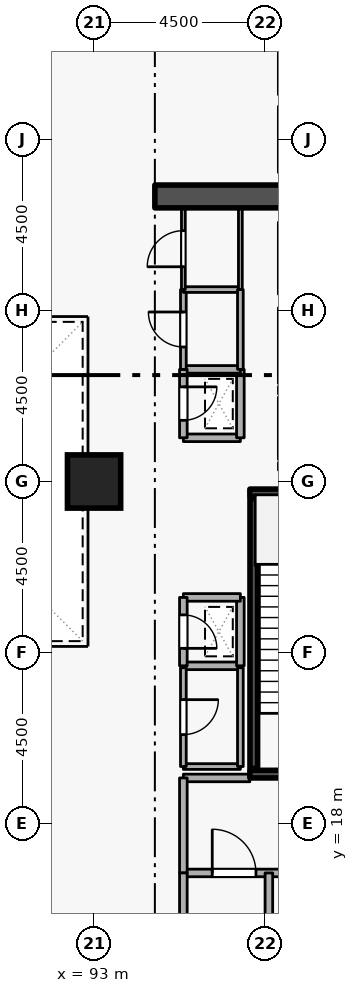
"""IFC4 building model, lengths in metres.
Left out: names, types, materials, properties, quantities, classifications, styles, units other than length and angle.
Written with IfcOpenShell. Run it as: python <this file> out.ifc"""

import sys

from ifc_helpers import new_model, si_unit, direction, frame, frame_2d, origin, origin_2d, place, context, subcontext, project, spatial, rectangle, extrude, element, fill, save


model = new_model("IFC4")
c1 = context("Model", 3, precision=1e-05, world=origin(), true_north=direction((0.0, 1.0)))
c2 = subcontext(c1, "Body", "Model", "MODEL_VIEW")
j1 = project(units=[si_unit("LENGTHUNIT", "METRE"), si_unit("PLANEANGLEUNIT", "RADIAN")], contexts=[c1])
p1 = place(None, origin())
s1 = spatial("IfcSite", under=j1, at=p1, CompositionType="ELEMENT")
p2 = place(p1, origin())
s2 = spatial("IfcBuilding", under=s1, at=p2, CompositionType="ELEMENT")
p3 = place(p2, origin())
s3 = spatial("IfcBuildingStorey", under=s2, at=p3, CompositionType="ELEMENT", Elevation=0.0)
p4 = place(p3, frame((94.6, 34.5, 0.0), z_axis=(0.0, 0.0, 1.0), x_axis=(1.0, 0.0, 0.0)))
e1 = element("IfcWall", 1, at=p4, inside=s3, PredefinedType="SHEAR", context=c2, shape_type="SweptSolid", body=[
    extrude(rectangle(XDim=5.7, YDim=0.6, at=frame_2d((2.85, 0.0))), origin(), (0.0, 0.0, 1.0), 4.8),
])
p5 = place(p3, frame((93.0, 27.0, 0.0), z_axis=(0.0, 0.0, 1.0), x_axis=(1.0, 0.0, 0.0)))
e2 = element("IfcColumn", 2, at=p5, inside=s3, PredefinedType="COLUMN", context=c2, shape_type="SweptSolid", body=[
    extrude(rectangle(XDim=1.4, YDim=1.4, at=origin_2d()), origin(), (0.0, 0.0, 1.0), 4.8),
])
p6 = place(p3, frame((97.95, 29.22, 0.0), z_axis=(0.0, 0.0, 1.0), x_axis=(0.0, -1.0, 0.0)))
e3 = element("IfcWall", 3, at=p6, inside=s3, PredefinedType="STANDARD", context=c2, shape_type="SweptSolid", body=[
    extrude(rectangle(XDim=1.64, YDim=0.2, at=frame_2d((0.82, 0.0))), origin(), (0.0, 0.0, 1.0), 4.46),
])
p7 = place(p6, frame((0.31, 0.0, 0.0)))
e4 = element("IfcOpeningElement", 4, at=p7, cuts=e3, PredefinedType="OPENING", context=c2, shape_type="SweptSolid", body=[
    extrude(rectangle(XDim=1.02, YDim=2.06, at=frame_2d((0.51, 1.03))), frame((0.0, 0.11, 0.0), z_axis=(0.0, -1.0, 0.0), x_axis=(1.0, 0.0, 0.0)), (0.0, 0.0, 1.0), 0.22),
])
p8 = place(p3, frame((97.95, 31.57, 0.0), z_axis=(0.0, 0.0, 1.0), x_axis=(0.0, -1.0, 0.0)))
e5 = element("IfcWall", 5, at=p8, inside=s3, PredefinedType="STANDARD", context=c2, shape_type="SweptSolid", body=[
    extrude(rectangle(XDim=1.99, YDim=0.2, at=frame_2d((0.995, 0.0))), origin(), (0.0, 0.0, 1.0), 4.46),
])
p9 = place(p8, frame((0.485, 0.0, 0.0)))
e6 = element("IfcOpeningElement", 6, at=p9, cuts=e5, PredefinedType="OPENING", context=c2, shape_type="SweptSolid", body=[
    extrude(rectangle(XDim=1.02, YDim=2.06, at=frame_2d((0.51, 1.03))), frame((0.0, 0.11, 0.0), z_axis=(0.0, -1.0, 0.0), x_axis=(1.0, 0.0, 0.0)), (0.0, 0.0, 1.0), 0.22),
])
p10 = place(p3, frame((97.95, 33.82, 0.0), z_axis=(0.0, 0.0, 1.0), x_axis=(0.0, -1.0, 0.0)))
e7 = element("IfcWall", 7, at=p10, inside=s3, PredefinedType="STANDARD", context=c2, shape_type="SweptSolid", body=[
    extrude(rectangle(XDim=1.89, YDim=0.2, at=frame_2d((0.945, 0.0))), origin(), (0.0, 0.0, 1.0), 4.46),
])
p11 = place(p10, frame((0.435, 0.0, 0.0)))
e8 = element("IfcOpeningElement", 8, at=p11, cuts=e7, PredefinedType="OPENING", context=c2, shape_type="SweptSolid", body=[
    extrude(rectangle(XDim=1.02, YDim=2.06, at=frame_2d((0.51, 1.03))), frame((0.0, 0.11, 0.0), z_axis=(0.0, -1.0, 0.0), x_axis=(1.0, 0.0, 0.0)), (0.0, 0.0, 1.0), 0.22),
])
p12 = place(p3, frame((97.95, 36.87, 0.0), z_axis=(0.0, 0.0, 1.0), x_axis=(0.0, -1.0, 0.0)))
e9 = element("IfcWall", 9, at=p12, inside=s3, PredefinedType="STANDARD", context=c2, shape_type="SweptSolid", body=[
    extrude(rectangle(XDim=1.74, YDim=0.2, at=frame_2d((0.87, 0.0))), origin(), (0.0, 0.0, 1.0), 4.46),
])
p13 = place(p12, frame((0.36, 0.0, 0.0)))
e10 = element("IfcOpeningElement", 10, at=p13, cuts=e9, PredefinedType="OPENING", context=c2, shape_type="SweptSolid", body=[
    extrude(rectangle(XDim=1.02, YDim=2.06, at=frame_2d((0.51, 1.03))), frame((0.0, 0.11, 0.0), z_axis=(0.0, -1.0, 0.0), x_axis=(1.0, 0.0, 0.0)), (0.0, 0.0, 1.0), 0.22),
])
p14 = place(p3, frame((97.95, 38.97, 0.0), z_axis=(0.0, 0.0, 1.0), x_axis=(0.0, -1.0, 0.0)))
e11 = element("IfcWall", 11, at=p14, inside=s3, PredefinedType="STANDARD", context=c2, shape_type="SweptSolid", body=[
    extrude(rectangle(XDim=1.79, YDim=0.2, at=frame_2d((0.895, 0.0))), origin(), (0.0, 0.0, 1.0), 4.46),
])
p15 = place(p14, frame((0.385, 0.0, 0.0)))
e12 = element("IfcOpeningElement", 12, at=p15, cuts=e11, PredefinedType="OPENING", context=c2, shape_type="SweptSolid", body=[
    extrude(rectangle(XDim=1.02, YDim=2.06, at=frame_2d((0.51, 1.03))), frame((0.0, 0.11, 0.0), z_axis=(0.0, -1.0, 0.0), x_axis=(1.0, 0.0, 0.0)), (0.0, 0.0, 1.0), 0.22),
])
p16 = place(p3, frame((100.45, 19.3, 0.0), z_axis=(0.0, 0.0, 1.0), x_axis=(-1.0, 0.0, 0.0)))
e13 = element("IfcWall", 13, at=p16, inside=s3, PredefinedType="SHEAR", context=c2, shape_type="SweptSolid", body=[
    extrude(rectangle(XDim=3.35, YDim=0.2, at=frame_2d((1.675, 0.0))), origin(), (0.0, 0.0, 1.0), 4.8),
])
p17 = place(p16, frame((1.125, 0.0, 0.0)))
e14 = element("IfcOpeningElement", 14, at=p17, cuts=e13, PredefinedType="OPENING", context=c2, shape_type="SweptSolid", body=[
    extrude(rectangle(XDim=1.1, YDim=2.1, at=frame_2d((0.55, 1.05))), frame((0.0, 0.11, 0.0), z_axis=(0.0, -1.0, 0.0), x_axis=(1.0, 0.0, 0.0)), (0.0, 0.0, 1.0), 0.22),
])
p18 = place(p3, frame((97.1, 26.7, 0.0), z_axis=(0.0, 0.0, 1.0), x_axis=(1.0, 0.0, 0.0)))
e15 = element("IfcWall", 15, at=p18, inside=s3, PredefinedType="SHEAR", context=c2, shape_type="SweptSolid", body=[
    extrude(rectangle(XDim=3.35, YDim=0.2, at=frame_2d((1.675, 0.0))), origin(), (0.0, 0.0, 1.0), 4.8),
])
p19 = place(p3, frame((97.203, 26.55, 0.0), z_axis=(0.0, 0.0, 1.0), x_axis=(0.0, -1.0, 0.0)))
e16 = element("IfcWall", 16, at=p19, inside=s3, PredefinedType="SHEAR", context=c2, shape_type="SweptSolid", body=[
    extrude(rectangle(XDim=7.1, YDim=0.2, at=frame_2d((3.55, 0.0))), origin(), (0.0, 0.0, 1.0), 4.8),
])
p20 = place(p3, frame((95.35, 16.7, 0.0), z_axis=(0.0, 0.0, 1.0), x_axis=(1.0, 0.0, 0.0)))
e17 = element("IfcWall", 17, at=p20, inside=s3, PredefinedType="STANDARD", context=c2, shape_type="SweptSolid", body=[
    extrude(rectangle(XDim=5.15, YDim=0.2, at=frame_2d((2.575, 0.0))), origin(), (0.0, 0.0, 1.0), 4.46),
])
p21 = place(p20, frame((2.917, 0.0, 0.0)))
e18 = element("IfcOpeningElement", 18, at=p21, cuts=e17, PredefinedType="OPENING", context=c2, shape_type="SweptSolid", body=[
    extrude(rectangle(XDim=1.15, YDim=2.1, at=frame_2d((0.575, 1.05))), frame((0.0, 0.11, 0.0), z_axis=(0.0, -1.0, 0.0), x_axis=(1.0, 0.0, 0.0)), (0.0, 0.0, 1.0), 0.22),
])
p22 = place(p20, frame((0.76, 0.0, 0.0)))
e19 = element("IfcOpeningElement", 19, at=p22, cuts=e17, PredefinedType="OPENING", context=c2, shape_type="SweptSolid", body=[
    extrude(rectangle(XDim=1.15, YDim=2.1, at=frame_2d((0.575, 1.05))), frame((0.0, 0.11, 0.0), z_axis=(0.0, -1.0, 0.0), x_axis=(1.0, 0.0, 0.0)), (0.0, 0.0, 1.0), 0.22),
])
p23 = place(p3, frame((97.1, 19.2, 0.0), z_axis=(0.0, 0.0, 1.0), x_axis=(-1.0, 0.0, 0.0)))
e20 = element("IfcWall", 20, at=p23, inside=s3, PredefinedType="STANDARD", context=c2, shape_type="SweptSolid", body=[
    extrude(rectangle(XDim=1.75, YDim=0.2, at=frame_2d((0.875, 0.0))), origin(), (0.0, 0.0, 1.0), 3.665),
])
p24 = place(p3, frame((95.35, 19.2, 0.0), z_axis=(0.0, 0.0, 1.0), x_axis=(0.0, -1.0, 0.0)))
e21 = element("IfcWall", 21, at=p24, inside=s3, PredefinedType="STANDARD", context=c2, shape_type="SweptSolid", body=[
    extrude(rectangle(XDim=2.5, YDim=0.2, at=frame_2d((1.25, 0.0))), origin(), (0.0, 0.0, 1.0), 4.46),
])
p25 = place(p3, frame((95.35, 28.15, 0.0), z_axis=(0.0, 0.0, 1.0), x_axis=(1.0, 0.0, 0.0)))
e22 = element("IfcWall", 22, at=p25, inside=s3, PredefinedType="STANDARD", context=c2, shape_type="SweptSolid", body=[
    extrude(rectangle(XDim=1.5, YDim=0.2, at=frame_2d((0.75, 0.0))), origin(), (0.0, 0.0, 1.0), 4.46),
])
p26 = place(p3, frame((96.85, 28.15, 0.0), z_axis=(0.0, 0.0, 1.0), x_axis=(0.0, 1.0, 0.0)))
e23 = element("IfcWall", 23, at=p26, inside=s3, PredefinedType="STANDARD", context=c2, shape_type="SweptSolid", body=[
    extrude(rectangle(XDim=1.8, YDim=0.2, at=frame_2d((0.9, 0.0))), origin(), (0.0, 0.0, 1.0), 4.46),
])
p27 = place(p3, frame((96.85, 29.95, 0.0), z_axis=(0.0, 0.0, 1.0), x_axis=(-1.0, 0.0, 0.0)))
e24 = element("IfcWall", 24, at=p27, inside=s3, PredefinedType="STANDARD", context=c2, shape_type="SweptSolid", body=[
    extrude(rectangle(XDim=1.5, YDim=0.2, at=frame_2d((0.75, 0.0))), origin(), (0.0, 0.0, 1.0), 4.46),
])
p28 = place(p3, frame((95.35, 29.95, 0.0), z_axis=(0.0, 0.0, 1.0), x_axis=(0.0, -1.0, 0.0)))
e25 = element("IfcWall", 25, at=p28, inside=s3, PredefinedType="STANDARD", context=c2, shape_type="SweptSolid", body=[
    extrude(rectangle(XDim=1.8, YDim=0.2, at=frame_2d((0.9, 0.0))), origin(), (0.0, 0.0, 1.0), 4.46),
])
p29 = place(p28, frame((0.46, 0.0, 0.0)))
e26 = element("IfcOpeningElement", 26, at=p29, cuts=e25, PredefinedType="OPENING", context=c2, shape_type="SweptSolid", body=[
    extrude(rectangle(XDim=0.88, YDim=2.04, at=frame_2d((0.44, 1.02))), frame((0.0, 0.11, 0.0), z_axis=(0.0, -1.0, 0.0), x_axis=(1.0, 0.0, 0.0)), (0.0, 0.0, 1.0), 0.22),
])
p30 = place(p3, frame((95.35, 22.15, 0.0), z_axis=(0.0, 0.0, 1.0), x_axis=(1.0, 0.0, 0.0)))
e27 = element("IfcWall", 27, at=p30, inside=s3, PredefinedType="STANDARD", context=c2, shape_type="SweptSolid", body=[
    extrude(rectangle(XDim=1.5, YDim=0.2, at=frame_2d((0.75, 0.0))), origin(), (0.0, 0.0, 1.0), 4.46),
])
p31 = place(p3, frame((96.85, 22.15, 0.0), z_axis=(0.0, 0.0, 1.0), x_axis=(0.0, 1.0, 0.0)))
e28 = element("IfcWall", 28, at=p31, inside=s3, PredefinedType="STANDARD", context=c2, shape_type="SweptSolid", body=[
    extrude(rectangle(XDim=1.8, YDim=0.2, at=frame_2d((0.9, 0.0))), origin(), (0.0, 0.0, 1.0), 4.46),
])
p32 = place(p3, frame((96.85, 23.95, 0.0), z_axis=(0.0, 0.0, 1.0), x_axis=(-1.0, 0.0, 0.0)))
e29 = element("IfcWall", 29, at=p32, inside=s3, PredefinedType="STANDARD", context=c2, shape_type="SweptSolid", body=[
    extrude(rectangle(XDim=1.5, YDim=0.2, at=frame_2d((0.75, 0.0))), origin(), (0.0, 0.0, 1.0), 4.46),
])
p33 = place(p3, frame((95.35, 23.95, 0.0), z_axis=(0.0, 0.0, 1.0), x_axis=(0.0, -1.0, 0.0)))
e30 = element("IfcWall", 30, at=p33, inside=s3, PredefinedType="STANDARD", context=c2, shape_type="SweptSolid", body=[
    extrude(rectangle(XDim=1.8, YDim=0.2, at=frame_2d((0.9, 0.0))), origin(), (0.0, 0.0, 1.0), 4.46),
])
p34 = place(p33, frame((0.46, 0.0, 0.0)))
e31 = element("IfcOpeningElement", 31, at=p34, cuts=e30, PredefinedType="OPENING", context=c2, shape_type="SweptSolid", body=[
    extrude(rectangle(XDim=0.88, YDim=2.04, at=frame_2d((0.44, 1.02))), frame((0.0, 0.11, 0.0), z_axis=(0.0, -1.0, 0.0), x_axis=(1.0, 0.0, 0.0)), (0.0, 0.0, 1.0), 0.22),
])
for number, where, z_axis, x_axis in (
    (32, (95.35, 4.82, 0.0), (0.0, 0.0, 1.0), (0.0, 1.0, 0.0)),
    (33, (97.6, 16.7, 0.0), (0.0, 0.0, 1.0), (0.0, -1.0, 0.0)),
):
    element("IfcWall", number, at=place(p3, frame(where, z_axis=z_axis, x_axis=x_axis)), inside=s3, PredefinedType="STANDARD", context=c2, shape_type="SweptSolid", body=[
        extrude(rectangle(XDim=11.88, YDim=0.2, at=frame_2d((5.94, 0.0))), origin(), (0.0, 0.0, 1.0), 4.46),
    ])
p35 = place(p3, frame((95.35, 19.5, 0.0), z_axis=(0.0, 0.0, 1.0), x_axis=(1.0, 0.0, 0.0)))
e34 = element("IfcWall", 34, at=p35, inside=s3, PredefinedType="PARTITIONING", context=c2, shape_type="SweptSolid", body=[
    extrude(rectangle(XDim=1.5, YDim=0.15, at=frame_2d((0.75, 0.0))), origin(), (0.0, 0.0, 1.0), 3.665),
])
p36 = place(p3, frame((96.85, 19.5, 0.0), z_axis=(0.0, 0.0, 1.0), x_axis=(0.0, 1.0, 0.0)))
e35 = element("IfcWall", 35, at=p36, inside=s3, PredefinedType="PARTITIONING", context=c2, shape_type="SweptSolid", body=[
    extrude(rectangle(XDim=2.6, YDim=0.15, at=frame_2d((1.3, 0.0))), origin(), (0.0, 0.0, 1.0), 4.46),
])
p37 = place(p3, frame((95.35, 22.1, 0.0), z_axis=(0.0, 0.0, 1.0), x_axis=(0.0, -1.0, 0.0)))
e36 = element("IfcWall", 36, at=p37, inside=s3, PredefinedType="PARTITIONING", context=c2, shape_type="SweptSolid", body=[
    extrude(rectangle(XDim=2.6, YDim=0.15, at=frame_2d((1.3, 0.0))), origin(), (0.0, 0.0, 1.0), 4.46),
])
p38 = place(p37, frame((0.84, 0.0, 0.0)))
e37 = element("IfcOpeningElement", 37, at=p38, cuts=e36, PredefinedType="OPENING", context=c2, shape_type="SweptSolid", body=[
    extrude(rectangle(XDim=0.92, YDim=2.08, at=frame_2d((0.46, 1.04))), frame((0.0, 0.085, 0.0), z_axis=(0.0, -1.0, 0.0), x_axis=(1.0, 0.0, 0.0)), (0.0, 0.0, 1.0), 0.17),
])
p39 = place(p3, frame((95.35, 29.95, 0.0), z_axis=(0.0, 0.0, 1.0), x_axis=(0.0, 1.0, 0.0)))
e38 = element("IfcWall", 38, at=p39, inside=s3, PredefinedType="PARTITIONING", context=c2, shape_type="SweptSolid", body=[
    extrude(rectangle(XDim=2.1, YDim=0.15, at=frame_2d((1.05, 0.0))), origin(), (0.0, 0.0, 1.0), 4.46),
])
p40 = place(p39, frame((0.59, 0.0, 0.0)))
e39 = element("IfcOpeningElement", 39, at=p40, cuts=e38, PredefinedType="OPENING", context=c2, shape_type="SweptSolid", body=[
    extrude(rectangle(XDim=0.92, YDim=2.08, at=frame_2d((0.46, 1.04))), frame((0.0, 0.085, 0.0), z_axis=(0.0, -1.0, 0.0), x_axis=(1.0, 0.0, 0.0)), (0.0, 0.0, 1.0), 0.17),
])
p41 = place(p3, frame((95.35, 32.05, 0.0), z_axis=(0.0, 0.0, 1.0), x_axis=(1.0, 0.0, 0.0)))
e40 = element("IfcWall", 40, at=p41, inside=s3, PredefinedType="PARTITIONING", context=c2, shape_type="SweptSolid", body=[
    extrude(rectangle(XDim=1.5, YDim=0.15, at=frame_2d((0.75, 0.0))), origin(), (0.0, 0.0, 1.0), 4.46),
])
p42 = place(p3, frame((96.85, 32.05, 0.0), z_axis=(0.0, 0.0, 1.0), x_axis=(0.0, -1.0, 0.0)))
e41 = element("IfcWall", 41, at=p42, inside=s3, PredefinedType="PARTITIONING", context=c2, shape_type="SweptSolid", body=[
    extrude(rectangle(XDim=2.1, YDim=0.15, at=frame_2d((1.05, 0.0))), origin(), (0.0, 0.0, 1.0), 4.46),
])
p43 = place(p3, frame((95.35, 32.05, 0.0), z_axis=(0.0, 0.0, 1.0), x_axis=(0.0, 1.0, 0.0)))
e42 = element("IfcWall", 42, at=p43, inside=s3, PredefinedType="PARTITIONING", context=c2, shape_type="SweptSolid", body=[
    extrude(rectangle(XDim=2.15, YDim=0.1, at=frame_2d((1.075, 0.0))), origin(), (0.0, 0.0, 1.0), 4.46),
])
p44 = place(p43, frame((0.6, 0.0, 0.0)))
e43 = element("IfcOpeningElement", 43, at=p44, cuts=e42, PredefinedType="OPENING", context=c2, shape_type="SweptSolid", body=[
    extrude(rectangle(XDim=0.95, YDim=2.1, at=frame_2d((0.475, 1.05))), frame((0.0, 0.06, 0.0), z_axis=(0.0, -1.0, 0.0), x_axis=(1.0, 0.0, 0.0)), (0.0, 0.0, 1.0), 0.12),
])
p45 = place(p3, frame((96.85, 34.2, 0.0), z_axis=(0.0, 0.0, 1.0), x_axis=(0.0, -1.0, 0.0)))
e44 = element("IfcWall", 44, at=p45, inside=s3, PredefinedType="PARTITIONING", context=c2, shape_type="SweptSolid", body=[
    extrude(rectangle(XDim=2.15, YDim=0.1, at=frame_2d((1.075, 0.0))), origin(), (0.0, 0.0, 1.0), 4.46),
])
p46 = place(p29, origin())
e45 = element("IfcDoor", 45, at=p46, inside=s3, OperationType="SINGLE_SWING_LEFT", PredefinedType="DOOR", context=c2, shape_type="SweptSolid", body=[
    extrude(rectangle(XDim=0.88, YDim=2.04, at=frame_2d((0.44, 1.02))), frame((0.0, 0.025, 0.0), z_axis=(0.0, -1.0, 0.0), x_axis=(1.0, 0.0, 0.0)), (0.0, 0.0, 1.0), 0.05),
])
fill(e26, e45)
p47 = place(p34, origin())
e46 = element("IfcDoor", 46, at=p47, inside=s3, OperationType="SINGLE_SWING_RIGHT", PredefinedType="DOOR", context=c2, shape_type="SweptSolid", body=[
    extrude(rectangle(XDim=0.88, YDim=2.04, at=frame_2d((0.44, 1.02))), frame((0.0, 0.025, 0.0), z_axis=(0.0, -1.0, 0.0), x_axis=(1.0, 0.0, 0.0)), (0.0, 0.0, 1.0), 0.05),
])
fill(e31, e46)
p48 = place(p38, origin())
e47 = element("IfcDoor", 47, at=p48, inside=s3, OperationType="SINGLE_SWING_LEFT", PredefinedType="DOOR", context=c2, shape_type="SweptSolid", body=[
    extrude(rectangle(XDim=0.92, YDim=2.08, at=frame_2d((0.46, 1.04))), frame((0.0, 0.025, 0.0), z_axis=(0.0, -1.0, 0.0), x_axis=(1.0, 0.0, 0.0)), (0.0, 0.0, 1.0), 0.05),
])
fill(e37, e47)
p49 = place(p40, origin())
e48 = element("IfcDoor", 48, at=p49, inside=s3, OperationType="SINGLE_SWING_RIGHT", PredefinedType="DOOR", context=c2, shape_type="SweptSolid", body=[
    extrude(rectangle(XDim=0.92, YDim=2.08, at=frame_2d((0.46, 1.04))), frame((0.0, 0.025, 0.0), z_axis=(0.0, -1.0, 0.0), x_axis=(1.0, 0.0, 0.0)), (0.0, 0.0, 1.0), 0.05),
])
fill(e39, e48)
p50 = place(p44, origin())
e49 = element("IfcDoor", 49, at=p50, inside=s3, OperationType="SINGLE_SWING_LEFT", PredefinedType="DOOR", context=c2, shape_type="SweptSolid", body=[
    extrude(rectangle(XDim=0.95, YDim=2.1, at=frame_2d((0.475, 1.05))), frame((0.0, 0.025, 0.0), z_axis=(0.0, -1.0, 0.0), x_axis=(1.0, 0.0, 0.0)), (0.0, 0.0, 1.0), 0.05),
])
fill(e43, e49)
p51 = place(p22, origin())
e50 = element("IfcDoor", 50, at=p51, inside=s3, OperationType="SINGLE_SWING_LEFT", PredefinedType="DOOR", context=c2, shape_type="SweptSolid", body=[
    extrude(rectangle(XDim=1.15, YDim=2.1, at=frame_2d((0.575, 1.05))), frame((0.0, 0.025, 0.0), z_axis=(0.0, -1.0, 0.0), x_axis=(1.0, 0.0, 0.0)), (0.0, 0.0, 1.0), 0.05),
])
fill(e19, e50)
save(model, sys.argv[1])
